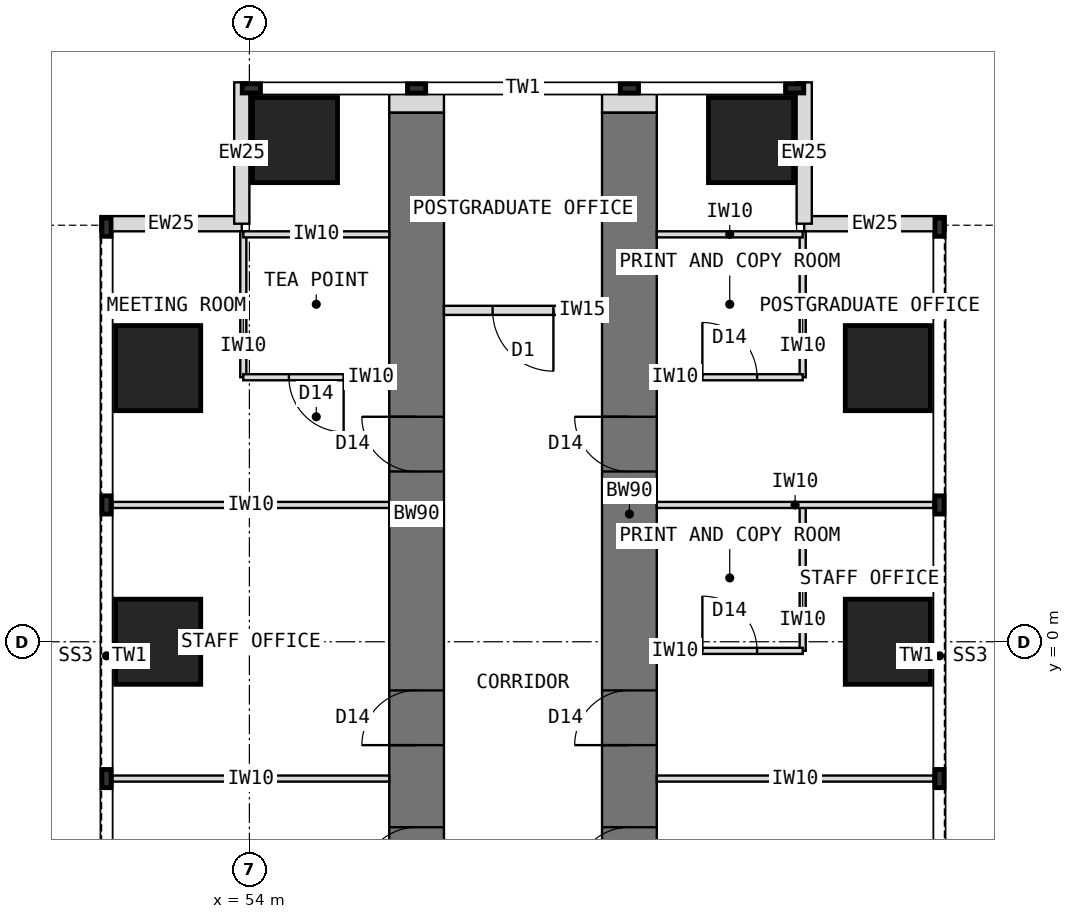
"""IFC4 building model, lengths in metres.
Left out: names, types, materials, properties, quantities, classifications, styles, units other than length and angle.
Written with IfcOpenShell. Run it as: python <this file> out.ifc"""

import sys

from ifc_helpers import new_model, si_unit, direction, frame, frame_2d, origin, origin_2d, place, context, subcontext, project, spatial, rectangle, extrude, element, fill, save


model = new_model("IFC4")
c1 = context("Model", 3, precision=1e-05, world=origin(), true_north=direction((0.0, 1.0)))
c2 = subcontext(c1, "Body", "Model", "MODEL_VIEW")
j1 = project(units=[si_unit("LENGTHUNIT", "METRE"), si_unit("PLANEANGLEUNIT", "RADIAN")], contexts=[c1])
p1 = place(None, origin())
s1 = spatial("IfcSite", under=j1, at=p1, CompositionType="ELEMENT")
p2 = place(p1, origin())
s2 = spatial("IfcBuilding", under=s1, at=p2, CompositionType="ELEMENT")
p3 = place(p2, frame((0.0, 0.0, 72.5)))
s3 = spatial("IfcBuildingStorey", under=s2, at=p3, CompositionType="ELEMENT", Elevation=72.5)
p4 = place(p3, frame((56.75, -4.5, 0.0), z_axis=(0.0, 0.0, 1.0), x_axis=(0.0, 1.0, 0.0)))
e1 = element("IfcWall", 1, at=p4, inside=s3, PredefinedType="SHEAR", context=c2, shape_type="SweptSolid", body=[
    extrude(rectangle(XDim=13.2, YDim=0.9, at=frame_2d((6.6, 0.0))), origin(), (0.0, 0.0, 1.0), 4.0),
])
p5 = place(p4, frame((0.55, 0.0, 0.0)))
e2 = element("IfcOpeningElement", 2, at=p5, cuts=e1, PredefinedType="OPENING", context=c2, shape_type="SweptSolid", body=[
    extrude(rectangle(XDim=0.9, YDim=2.1, at=frame_2d((0.45, 1.05))), frame((0.0, 0.46, 0.0), z_axis=(0.0, -1.0, 0.0), x_axis=(1.0, 0.0, 0.0)), (0.0, 0.0, 1.0), 0.92),
])
p6 = place(p4, frame((2.8, 0.0, 0.0)))
e3 = element("IfcOpeningElement", 3, at=p6, cuts=e1, PredefinedType="OPENING", context=c2, shape_type="SweptSolid", body=[
    extrude(rectangle(XDim=0.9, YDim=2.1, at=frame_2d((0.45, 1.05))), frame((0.0, 0.46, 0.0), z_axis=(0.0, -1.0, 0.0), x_axis=(1.0, 0.0, 0.0)), (0.0, 0.0, 1.0), 0.92),
])
p7 = place(p4, frame((7.3, 0.0, 0.0)))
e4 = element("IfcOpeningElement", 4, at=p7, cuts=e1, PredefinedType="OPENING", context=c2, shape_type="SweptSolid", body=[
    extrude(rectangle(XDim=0.9, YDim=2.1, at=frame_2d((0.45, 1.05))), frame((0.0, 0.46, 0.0), z_axis=(0.0, -1.0, 0.0), x_axis=(1.0, 0.0, 0.0)), (0.0, 0.0, 1.0), 0.92),
])
p8 = place(p3, frame((60.25, -4.5, 0.0), z_axis=(0.0, 0.0, 1.0), x_axis=(0.0, 1.0, 0.0)))
e5 = element("IfcWall", 5, at=p8, inside=s3, PredefinedType="SHEAR", context=c2, shape_type="SweptSolid", body=[
    extrude(rectangle(XDim=13.2, YDim=0.9, at=frame_2d((6.6, 0.0))), origin(), (0.0, 0.0, 1.0), 4.0),
])
p9 = place(p8, frame((0.55, 0.0, 0.0)))
e6 = element("IfcOpeningElement", 6, at=p9, cuts=e5, PredefinedType="OPENING", context=c2, shape_type="SweptSolid", body=[
    extrude(rectangle(XDim=0.9, YDim=2.1, at=frame_2d((0.45, 1.05))), frame((0.0, 0.46, 0.0), z_axis=(0.0, -1.0, 0.0), x_axis=(1.0, 0.0, 0.0)), (0.0, 0.0, 1.0), 0.92),
])
p10 = place(p8, frame((2.8, 0.0, 0.0)))
e7 = element("IfcOpeningElement", 7, at=p10, cuts=e5, PredefinedType="OPENING", context=c2, shape_type="SweptSolid", body=[
    extrude(rectangle(XDim=0.9, YDim=2.1, at=frame_2d((0.45, 1.05))), frame((0.0, 0.46, 0.0), z_axis=(0.0, -1.0, 0.0), x_axis=(1.0, 0.0, 0.0)), (0.0, 0.0, 1.0), 0.92),
])
p11 = place(p8, frame((7.3, 0.0, 0.0)))
e8 = element("IfcOpeningElement", 8, at=p11, cuts=e5, PredefinedType="OPENING", context=c2, shape_type="SweptSolid", body=[
    extrude(rectangle(XDim=0.9, YDim=2.1, at=frame_2d((0.45, 1.05))), frame((0.0, 0.46, 0.0), z_axis=(0.0, -1.0, 0.0), x_axis=(1.0, 0.0, 0.0)), (0.0, 0.0, 1.0), 0.92),
])
for number, where, z_axis, x_axis in (
    (9, (52.5, 0.0, 0.0), (0.0, 0.0, 1.0), (1.0, 0.0, 0.0)),
    (10, (64.5, 0.0, 0.0), (0.0, 0.0, 1.0), (1.0, 0.0, 0.0)),
    (11, (52.5, 4.5, 0.0), (0.0, 0.0, 1.0), (1.0, 0.0, 0.0)),
    (12, (64.5, 4.5, 0.0), (0.0, 0.0, 1.0), (1.0, 0.0, 0.0)),
    (13, (54.75, 8.25, 0.0), (0.0, 0.0, 1.0), (1.0, 0.0, 0.0)),
    (14, (62.25, 8.25, 0.0), (0.0, 0.0, 1.0), (1.0, 0.0, 0.0)),
):
    element("IfcColumn", number, at=place(p3, frame(where, z_axis=z_axis, x_axis=x_axis)), inside=s3, PredefinedType="COLUMN", context=c2, shape_type="SweptSolid", body=[
        extrude(rectangle(XDim=1.4, YDim=1.4, at=origin_2d()), origin(), (0.0, 0.0, 1.0), 4.0),
    ])
for number, where, z_axis, x_axis in (
    (15, (51.55, 6.875, 0.0), (0.0, 0.0, 1.0), (1.0, 0.0, 0.0)),
    (16, (53.875, 6.875, 0.0), (0.0, 0.0, 1.0), (0.0, 1.0, 0.0)),
    (17, (65.45, 6.875, 0.0), (0.0, 0.0, 1.0), (-1.0, 0.0, 0.0)),
    (18, (63.125, 6.875, 0.0), (0.0, 0.0, 1.0), (0.0, 1.0, 0.0)),
):
    element("IfcWall", number, at=place(p3, frame(where, z_axis=z_axis, x_axis=x_axis)), inside=s3, PredefinedType="STANDARD", context=c2, shape_type="SweptSolid", body=[
        extrude(rectangle(XDim=2.325, YDim=0.25, at=frame_2d((1.163, 0.0))), origin(), (0.0, 0.0, 1.0), 3.8),
    ])
for number, where, z_axis, x_axis in (
    (19, (56.75, 8.7, 0.0), (0.0, 0.0, 1.0), (0.0, 1.0, 0.0)),
    (20, (60.25, 8.7, 0.0), (0.0, 0.0, 1.0), (0.0, 1.0, 0.0)),
):
    element("IfcWall", number, at=place(p3, frame(where, z_axis=z_axis, x_axis=x_axis)), inside=s3, PredefinedType="PARTITIONING", context=c2, shape_type="SweptSolid", body=[
        extrude(rectangle(XDim=0.31, YDim=0.9, at=frame_2d((0.155, 0.0))), origin(), (0.0, 0.0, 1.0), 3.8),
    ])
for number, where, z_axis, x_axis in (
    (21, (56.3, -2.25, 0.0), (0.0, 0.0, 1.0), (-1.0, 0.0, 0.0)),
    (22, (56.3, 2.25, 0.0), (0.0, 0.0, 1.0), (-1.0, 0.0, 0.0)),
):
    element("IfcWall", number, at=place(p3, frame(where, z_axis=z_axis, x_axis=x_axis)), inside=s3, PredefinedType="PARTITIONING", context=c2, shape_type="SweptSolid", body=[
        extrude(rectangle(XDim=4.55, YDim=0.1, at=frame_2d((2.275, 0.0))), origin(), (0.0, 0.0, 1.0), 3.8),
    ])
p12 = place(p3, frame((53.9, 4.35, 0.0), z_axis=(0.0, 0.0, 1.0), x_axis=(0.0, 1.0, 0.0)))
e23 = element("IfcWall", 23, at=p12, inside=s3, PredefinedType="PARTITIONING", context=c2, shape_type="SweptSolid", body=[
    extrude(rectangle(XDim=2.4, YDim=0.1, at=frame_2d((1.2, 0.0))), origin(), (0.0, 0.0, 1.0), 3.8),
])
p13 = place(p3, frame((56.3, 4.35, 0.0), z_axis=(0.0, 0.0, 1.0), x_axis=(-1.0, 0.0, 0.0)))
e24 = element("IfcWall", 24, at=p13, inside=s3, PredefinedType="PARTITIONING", context=c2, shape_type="SweptSolid", body=[
    extrude(rectangle(XDim=2.4, YDim=0.1, at=frame_2d((1.2, 0.0))), origin(), (0.0, 0.0, 1.0), 3.8),
])
p14 = place(p13, frame((0.75, 0.0, 0.0)))
e25 = element("IfcOpeningElement", 25, at=p14, cuts=e24, PredefinedType="OPENING", context=c2, shape_type="SweptSolid", body=[
    extrude(rectangle(XDim=0.9, YDim=2.1, at=frame_2d((0.45, 1.05))), frame((0.0, 0.06, 0.0), z_axis=(0.0, -1.0, 0.0), x_axis=(1.0, 0.0, 0.0)), (0.0, 0.0, 1.0), 0.12),
])
p15 = place(p3, frame((56.3, 6.7, 0.0), z_axis=(0.0, 0.0, 1.0), x_axis=(-1.0, 0.0, 0.0)))
e26 = element("IfcWall", 26, at=p15, inside=s3, PredefinedType="PARTITIONING", context=c2, shape_type="SweptSolid", body=[
    extrude(rectangle(XDim=2.4, YDim=0.1, at=frame_2d((1.2, 0.0))), origin(), (0.0, 0.0, 1.0), 3.8),
])
for number, where, z_axis, x_axis in (
    (27, (60.7, -2.25, 0.0), (0.0, 0.0, 1.0), (1.0, 0.0, 0.0)),
    (28, (60.7, 2.25, 0.0), (0.0, 0.0, 1.0), (1.0, 0.0, 0.0)),
):
    element("IfcWall", number, at=place(p3, frame(where, z_axis=z_axis, x_axis=x_axis)), inside=s3, PredefinedType="PARTITIONING", context=c2, shape_type="SweptSolid", body=[
        extrude(rectangle(XDim=4.55, YDim=0.1, at=frame_2d((2.275, 0.0))), origin(), (0.0, 0.0, 1.0), 3.8),
    ])
p16 = place(p3, frame((63.1, -0.15, 0.0), z_axis=(0.0, 0.0, 1.0), x_axis=(0.0, 1.0, 0.0)))
e29 = element("IfcWall", 29, at=p16, inside=s3, PredefinedType="PARTITIONING", context=c2, shape_type="SweptSolid", body=[
    extrude(rectangle(XDim=2.4, YDim=0.1, at=frame_2d((1.2, 0.0))), origin(), (0.0, 0.0, 1.0), 3.8),
])
p17 = place(p3, frame((60.7, -0.15, 0.0), z_axis=(0.0, 0.0, 1.0), x_axis=(1.0, 0.0, 0.0)))
e30 = element("IfcWall", 30, at=p17, inside=s3, PredefinedType="PARTITIONING", context=c2, shape_type="SweptSolid", body=[
    extrude(rectangle(XDim=2.4, YDim=0.1, at=frame_2d((1.2, 0.0))), origin(), (0.0, 0.0, 1.0), 3.8),
])
p18 = place(p17, frame((0.75, 0.0, 0.0)))
e31 = element("IfcOpeningElement", 31, at=p18, cuts=e30, PredefinedType="OPENING", context=c2, shape_type="SweptSolid", body=[
    extrude(rectangle(XDim=0.9, YDim=2.1, at=frame_2d((0.45, 1.05))), frame((0.0, 0.06, 0.0), z_axis=(0.0, -1.0, 0.0), x_axis=(1.0, 0.0, 0.0)), (0.0, 0.0, 1.0), 0.12),
])
p19 = place(p3, frame((63.1, 4.35, 0.0), z_axis=(0.0, 0.0, 1.0), x_axis=(0.0, 1.0, 0.0)))
e32 = element("IfcWall", 32, at=p19, inside=s3, PredefinedType="PARTITIONING", context=c2, shape_type="SweptSolid", body=[
    extrude(rectangle(XDim=2.4, YDim=0.1, at=frame_2d((1.2, 0.0))), origin(), (0.0, 0.0, 1.0), 3.8),
])
p20 = place(p3, frame((60.7, 4.35, 0.0), z_axis=(0.0, 0.0, 1.0), x_axis=(1.0, 0.0, 0.0)))
e33 = element("IfcWall", 33, at=p20, inside=s3, PredefinedType="PARTITIONING", context=c2, shape_type="SweptSolid", body=[
    extrude(rectangle(XDim=2.4, YDim=0.1, at=frame_2d((1.2, 0.0))), origin(), (0.0, 0.0, 1.0), 3.8),
])
p21 = place(p20, frame((0.75, 0.0, 0.0)))
e34 = element("IfcOpeningElement", 34, at=p21, cuts=e33, PredefinedType="OPENING", context=c2, shape_type="SweptSolid", body=[
    extrude(rectangle(XDim=0.9, YDim=2.1, at=frame_2d((0.45, 1.05))), frame((0.0, 0.06, 0.0), z_axis=(0.0, -1.0, 0.0), x_axis=(1.0, 0.0, 0.0)), (0.0, 0.0, 1.0), 0.12),
])
p22 = place(p3, frame((60.7, 6.7, 0.0), z_axis=(0.0, 0.0, 1.0), x_axis=(1.0, 0.0, 0.0)))
e35 = element("IfcWall", 35, at=p22, inside=s3, PredefinedType="PARTITIONING", context=c2, shape_type="SweptSolid", body=[
    extrude(rectangle(XDim=2.4, YDim=0.1, at=frame_2d((1.2, 0.0))), origin(), (0.0, 0.0, 1.0), 3.8),
])
p23 = place(p3, frame((59.8, 5.45, 0.0), z_axis=(0.0, 0.0, 1.0), x_axis=(-1.0, 0.0, 0.0)))
e36 = element("IfcWall", 36, at=p23, inside=s3, PredefinedType="PARTITIONING", context=c2, shape_type="SweptSolid", body=[
    extrude(rectangle(XDim=2.6, YDim=0.15, at=frame_2d((1.3, 0.0))), origin(), (0.0, 0.0, 1.0), 3.8),
])
p24 = place(p23, frame((0.8, 0.0, 0.0)))
e37 = element("IfcOpeningElement", 37, at=p24, cuts=e36, PredefinedType="OPENING", context=c2, shape_type="SweptSolid", body=[
    extrude(rectangle(XDim=1.0, YDim=2.1, at=frame_2d((0.5, 1.05))), frame((0.0, 0.085, 0.0), z_axis=(0.0, -1.0, 0.0), x_axis=(1.0, 0.0, 0.0)), (0.0, 0.0, 1.0), 0.17),
])
p25 = place(p14, origin())
e38 = element("IfcDoor", 38, at=p25, inside=s3, OperationType="SINGLE_SWING_LEFT", PredefinedType="DOOR", context=c2, shape_type="SweptSolid", body=[
    extrude(rectangle(XDim=0.9, YDim=2.1, at=frame_2d((0.45, 1.05))), frame((0.0, 0.025, 0.0), z_axis=(0.0, -1.0, 0.0), x_axis=(1.0, 0.0, 0.0)), (0.0, 0.0, 1.0), 0.05),
])
fill(e25, e38)
p26 = place(p18, origin())
e39 = element("IfcDoor", 39, at=p26, inside=s3, OperationType="SINGLE_SWING_LEFT", PredefinedType="DOOR", context=c2, shape_type="SweptSolid", body=[
    extrude(rectangle(XDim=0.9, YDim=2.1, at=frame_2d((0.45, 1.05))), frame((0.0, 0.025, 0.0), z_axis=(0.0, -1.0, 0.0), x_axis=(1.0, 0.0, 0.0)), (0.0, 0.0, 1.0), 0.05),
])
fill(e31, e39)
p27 = place(p21, origin())
e40 = element("IfcDoor", 40, at=p27, inside=s3, OperationType="SINGLE_SWING_LEFT", PredefinedType="DOOR", context=c2, shape_type="SweptSolid", body=[
    extrude(rectangle(XDim=0.9, YDim=2.1, at=frame_2d((0.45, 1.05))), frame((0.0, 0.025, 0.0), z_axis=(0.0, -1.0, 0.0), x_axis=(1.0, 0.0, 0.0)), (0.0, 0.0, 1.0), 0.05),
])
fill(e34, e40)
p28 = place(p24, origin())
e41 = element("IfcDoor", 41, at=p28, inside=s3, OperationType="SINGLE_SWING_LEFT", PredefinedType="DOOR", context=c2, shape_type="SweptSolid", body=[
    extrude(rectangle(XDim=1.0, YDim=2.1, at=frame_2d((0.5, 1.05))), frame((0.0, 0.025, 0.0), z_axis=(0.0, -1.0, 0.0), x_axis=(1.0, 0.0, 0.0)), (0.0, 0.0, 1.0), 0.05),
])
fill(e37, e41)
p29 = place(p5, origin())
e42 = element("IfcDoor", 42, at=p29, inside=s3, OperationType="SINGLE_SWING_LEFT", PredefinedType="DOOR", context=c2, shape_type="SweptSolid", body=[
    extrude(rectangle(XDim=0.82, YDim=2.06, at=frame_2d((0.45, 1.03))), frame((0.0, 0.025, 0.0), z_axis=(0.0, -1.0, 0.0), x_axis=(1.0, 0.0, 0.0)), (0.0, 0.0, 1.0), 0.05),
    extrude(rectangle(XDim=0.04, YDim=2.1, at=frame_2d((0.02, 1.05))), frame((0.0, 0.45, 0.0), z_axis=(0.0, -1.0, 0.0), x_axis=(1.0, 0.0, 0.0)), (0.0, 0.0, 1.0), 0.899),
    extrude(rectangle(XDim=0.04, YDim=2.1, at=frame_2d((0.88, 1.05))), frame((0.0, 0.45, 0.0), z_axis=(0.0, -1.0, 0.0), x_axis=(1.0, 0.0, 0.0)), (0.0, 0.0, 1.0), 0.899),
    extrude(rectangle(XDim=0.82, YDim=0.04, at=frame_2d((0.45, 2.08))), frame((0.0, 0.45, 0.0), z_axis=(0.0, -1.0, 0.0), x_axis=(1.0, 0.0, 0.0)), (0.0, 0.0, 1.0), 0.899),
])
fill(e2, e42)
p30 = place(p6, origin())
e43 = element("IfcDoor", 43, at=p30, inside=s3, OperationType="SINGLE_SWING_LEFT", PredefinedType="DOOR", context=c2, shape_type="SweptSolid", body=[
    extrude(rectangle(XDim=0.82, YDim=2.06, at=frame_2d((0.45, 1.03))), frame((0.0, 0.025, 0.0), z_axis=(0.0, -1.0, 0.0), x_axis=(1.0, 0.0, 0.0)), (0.0, 0.0, 1.0), 0.05),
    extrude(rectangle(XDim=0.04, YDim=2.1, at=frame_2d((0.02, 1.05))), frame((0.0, 0.45, 0.0), z_axis=(0.0, -1.0, 0.0), x_axis=(1.0, 0.0, 0.0)), (0.0, 0.0, 1.0), 0.899),
    extrude(rectangle(XDim=0.04, YDim=2.1, at=frame_2d((0.88, 1.05))), frame((0.0, 0.45, 0.0), z_axis=(0.0, -1.0, 0.0), x_axis=(1.0, 0.0, 0.0)), (0.0, 0.0, 1.0), 0.899),
    extrude(rectangle(XDim=0.82, YDim=0.04, at=frame_2d((0.45, 2.08))), frame((0.0, 0.45, 0.0), z_axis=(0.0, -1.0, 0.0), x_axis=(1.0, 0.0, 0.0)), (0.0, 0.0, 1.0), 0.899),
])
fill(e3, e43)
p31 = place(p7, origin())
e44 = element("IfcDoor", 44, at=p31, inside=s3, OperationType="SINGLE_SWING_RIGHT", PredefinedType="DOOR", context=c2, shape_type="SweptSolid", body=[
    extrude(rectangle(XDim=0.82, YDim=2.06, at=frame_2d((0.45, 1.03))), frame((0.0, 0.025, 0.0), z_axis=(0.0, -1.0, 0.0), x_axis=(1.0, 0.0, 0.0)), (0.0, 0.0, 1.0), 0.05),
    extrude(rectangle(XDim=0.04, YDim=2.1, at=frame_2d((0.02, 1.05))), frame((0.0, 0.45, 0.0), z_axis=(0.0, -1.0, 0.0), x_axis=(1.0, 0.0, 0.0)), (0.0, 0.0, 1.0), 0.899),
    extrude(rectangle(XDim=0.04, YDim=2.1, at=frame_2d((0.88, 1.05))), frame((0.0, 0.45, 0.0), z_axis=(0.0, -1.0, 0.0), x_axis=(1.0, 0.0, 0.0)), (0.0, 0.0, 1.0), 0.899),
    extrude(rectangle(XDim=0.82, YDim=0.04, at=frame_2d((0.45, 2.08))), frame((0.0, 0.45, 0.0), z_axis=(0.0, -1.0, 0.0), x_axis=(1.0, 0.0, 0.0)), (0.0, 0.0, 1.0), 0.899),
])
fill(e4, e44)
p32 = place(p9, origin())
e45 = element("IfcDoor", 45, at=p32, inside=s3, OperationType="SINGLE_SWING_LEFT", PredefinedType="DOOR", context=c2, shape_type="SweptSolid", body=[
    extrude(rectangle(XDim=0.82, YDim=2.06, at=frame_2d((0.45, 1.03))), frame((0.0, 0.025, 0.0), z_axis=(0.0, -1.0, 0.0), x_axis=(1.0, 0.0, 0.0)), (0.0, 0.0, 1.0), 0.05),
    extrude(rectangle(XDim=0.04, YDim=2.1, at=frame_2d((0.02, 1.05))), frame((0.0, 0.45, 0.0), z_axis=(0.0, -1.0, 0.0), x_axis=(1.0, 0.0, 0.0)), (0.0, 0.0, 1.0), 0.899),
    extrude(rectangle(XDim=0.04, YDim=2.1, at=frame_2d((0.88, 1.05))), frame((0.0, 0.45, 0.0), z_axis=(0.0, -1.0, 0.0), x_axis=(1.0, 0.0, 0.0)), (0.0, 0.0, 1.0), 0.899),
    extrude(rectangle(XDim=0.82, YDim=0.04, at=frame_2d((0.45, 2.08))), frame((0.0, 0.45, 0.0), z_axis=(0.0, -1.0, 0.0), x_axis=(1.0, 0.0, 0.0)), (0.0, 0.0, 1.0), 0.899),
])
fill(e6, e45)
p33 = place(p10, origin())
e46 = element("IfcDoor", 46, at=p33, inside=s3, OperationType="SINGLE_SWING_LEFT", PredefinedType="DOOR", context=c2, shape_type="SweptSolid", body=[
    extrude(rectangle(XDim=0.82, YDim=2.06, at=frame_2d((0.45, 1.03))), frame((0.0, 0.025, 0.0), z_axis=(0.0, -1.0, 0.0), x_axis=(1.0, 0.0, 0.0)), (0.0, 0.0, 1.0), 0.05),
    extrude(rectangle(XDim=0.04, YDim=2.1, at=frame_2d((0.02, 1.05))), frame((0.0, 0.45, 0.0), z_axis=(0.0, -1.0, 0.0), x_axis=(1.0, 0.0, 0.0)), (0.0, 0.0, 1.0), 0.899),
    extrude(rectangle(XDim=0.04, YDim=2.1, at=frame_2d((0.88, 1.05))), frame((0.0, 0.45, 0.0), z_axis=(0.0, -1.0, 0.0), x_axis=(1.0, 0.0, 0.0)), (0.0, 0.0, 1.0), 0.899),
    extrude(rectangle(XDim=0.82, YDim=0.04, at=frame_2d((0.45, 2.08))), frame((0.0, 0.45, 0.0), z_axis=(0.0, -1.0, 0.0), x_axis=(1.0, 0.0, 0.0)), (0.0, 0.0, 1.0), 0.899),
])
fill(e7, e46)
p34 = place(p11, origin())
e47 = element("IfcDoor", 47, at=p34, inside=s3, OperationType="SINGLE_SWING_RIGHT", PredefinedType="DOOR", context=c2, shape_type="SweptSolid", body=[
    extrude(rectangle(XDim=0.82, YDim=2.06, at=frame_2d((0.45, 1.03))), frame((0.0, 0.025, 0.0), z_axis=(0.0, -1.0, 0.0), x_axis=(1.0, 0.0, 0.0)), (0.0, 0.0, 1.0), 0.05),
    extrude(rectangle(XDim=0.04, YDim=2.1, at=frame_2d((0.02, 1.05))), frame((0.0, 0.45, 0.0), z_axis=(0.0, -1.0, 0.0), x_axis=(1.0, 0.0, 0.0)), (0.0, 0.0, 1.0), 0.899),
    extrude(rectangle(XDim=0.04, YDim=2.1, at=frame_2d((0.88, 1.05))), frame((0.0, 0.45, 0.0), z_axis=(0.0, -1.0, 0.0), x_axis=(1.0, 0.0, 0.0)), (0.0, 0.0, 1.0), 0.899),
    extrude(rectangle(XDim=0.82, YDim=0.04, at=frame_2d((0.45, 2.08))), frame((0.0, 0.45, 0.0), z_axis=(0.0, -1.0, 0.0), x_axis=(1.0, 0.0, 0.0)), (0.0, 0.0, 1.0), 0.899),
])
fill(e8, e47)
save(model, sys.argv[1])
